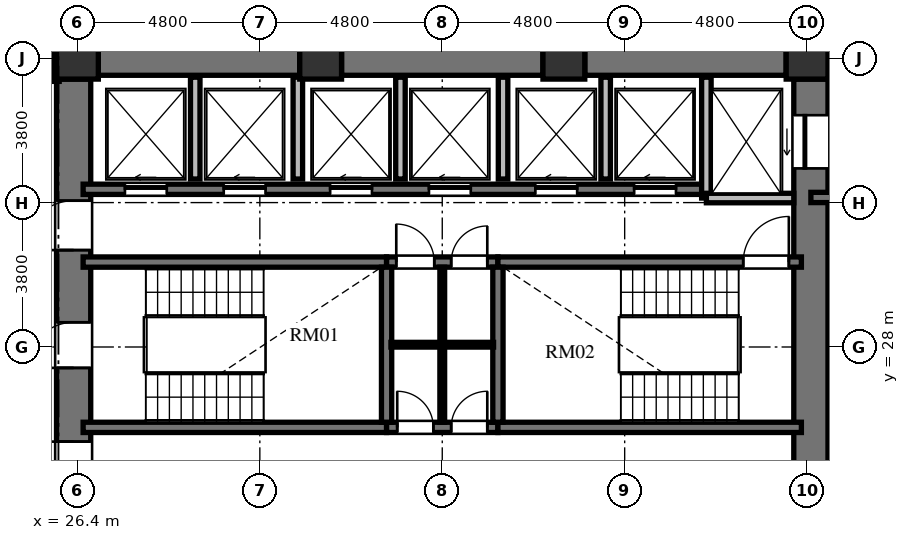
"""IFC4 building model, lengths in metres.
Left out: names, types, materials, properties, quantities, classifications, styles, units other than length and angle.
Written with IfcOpenShell. Run it as: python <this file> out.ifc"""

import sys

from ifc_helpers import new_model, si_unit, direction, frame, frame_2d, origin, origin_2d, place, context, subcontext, project, spatial, rectangle, extrude, element, fill, save


model = new_model("IFC4")
c1 = context("Model", 3, precision=1e-05, world=origin(), true_north=direction((0.0, 1.0)))
c2 = subcontext(c1, "Body", "Model", "MODEL_VIEW")
j1 = project(units=[si_unit("LENGTHUNIT", "METRE"), si_unit("PLANEANGLEUNIT", "RADIAN")], contexts=[c1])
p1 = place(None, origin())
s1 = spatial("IfcSite", under=j1, at=p1, CompositionType="ELEMENT")
p2 = place(p1, origin())
s2 = spatial("IfcBuilding", under=s1, at=p2, CompositionType="ELEMENT")
p3 = place(p2, frame((0.0, 0.0, 61.68)))
s3 = spatial("IfcBuildingStorey", under=s2, at=p3, CompositionType="ELEMENT", Elevation=61.68)
for number, where, z_axis, x_axis in (
    (1, (45.6, 35.6, 0.0), (0.0, 0.0, 1.0), (1.0, 0.0, 0.0)),
    (2, (39.2, 35.6, 0.0), (0.0, 0.0, 1.0), (1.0, 0.0, 0.0)),
    (3, (32.8, 35.6, 0.0), (0.0, 0.0, 1.0), (1.0, 0.0, 0.0)),
    (4, (26.4, 35.6, 0.0), (0.0, 0.0, 1.0), (1.0, 0.0, 0.0)),
):
    element("IfcColumn", number, at=place(p3, frame(where, z_axis=z_axis, x_axis=x_axis)), inside=s3, PredefinedType="COLUMN", context=c2, shape_type="SweptSolid", body=[
        extrude(rectangle(XDim=1.1, YDim=1.1, at=origin_2d()), origin(), (0.0, 0.0, 1.0), 3.648),
    ])
p4 = place(p3, frame((26.3, 20.95, 0.0), z_axis=(0.0, 0.0, 1.0), x_axis=(0.0, 1.0, 0.0)))
e5 = element("IfcWall", 5, at=p4, inside=s3, PredefinedType="SHEAR", context=c2, shape_type="SweptSolid", body=[
    extrude(rectangle(XDim=14.1, YDim=0.9, at=frame_2d((7.05, 0.0))), origin(), (0.0, 0.0, 1.0), 3.648),
])
p5 = place(p4, frame((6.5, 0.0, 0.0)))
e6 = element("IfcOpeningElement", 6, at=p5, cuts=e5, PredefinedType="OPENING", context=c2, shape_type="SweptSolid", body=[
    extrude(rectangle(XDim=1.2, YDim=2.15, at=frame_2d((0.6, 1.075))), frame((0.0, 0.46, 0.0), z_axis=(0.0, -1.0, 0.0), x_axis=(1.0, 0.0, 0.0)), (0.0, 0.0, 1.0), 0.92),
])
p6 = place(p4, frame((9.6, 0.0, 0.0)))
e7 = element("IfcOpeningElement", 7, at=p6, cuts=e5, PredefinedType="OPENING", context=c2, shape_type="SweptSolid", body=[
    extrude(rectangle(XDim=1.3, YDim=2.2, at=frame_2d((0.65, 1.1))), frame((0.0, 0.46, 0.0), z_axis=(0.0, -1.0, 0.0), x_axis=(1.0, 0.0, 0.0)), (0.0, 0.0, 1.0), 0.92),
])
p7 = place(p4, frame((3.26, 0.0, 0.0)))
e8 = element("IfcOpeningElement", 8, at=p7, cuts=e5, PredefinedType="OPENING", context=c2, shape_type="SweptSolid", body=[
    extrude(rectangle(XDim=1.3, YDim=2.2, at=frame_2d((0.65, 1.1))), frame((0.0, 0.46, 0.0), z_axis=(0.0, -1.0, 0.0), x_axis=(1.0, 0.0, 0.0)), (0.0, 0.0, 1.0), 0.92),
])
p8 = place(p3, frame((45.7, 20.95, 0.0), z_axis=(0.0, 0.0, 1.0), x_axis=(0.0, 1.0, 0.0)))
e9 = element("IfcWall", 9, at=p8, inside=s3, PredefinedType="SHEAR", context=c2, shape_type="SweptSolid", body=[
    extrude(rectangle(XDim=14.1, YDim=0.9, at=frame_2d((7.05, 0.0))), origin(), (0.0, 0.0, 1.0), 3.648),
])
p9 = place(p8, frame((11.75, 0.0, 0.0)))
e10 = element("IfcOpeningElement", 10, at=p9, cuts=e9, PredefinedType="OPENING", context=c2, shape_type="SweptSolid", body=[
    extrude(rectangle(XDim=1.4, YDim=2.3, at=frame_2d((0.7, 1.15))), frame((0.0, 0.46, 0.0), z_axis=(0.0, -1.0, 0.0), x_axis=(1.0, 0.0, 0.0)), (0.0, 0.0, 1.0), 0.92),
])
p10 = place(p8, frame((0.95, 0.0, 0.0)))
e11 = element("IfcOpeningElement", 11, at=p10, cuts=e9, PredefinedType="OPENING", context=c2, shape_type="SweptSolid", body=[
    extrude(rectangle(XDim=1.4, YDim=2.3, at=frame_2d((0.7, 1.15))), frame((0.0, 0.46, 0.0), z_axis=(0.0, -1.0, 0.0), x_axis=(1.0, 0.0, 0.0)), (0.0, 0.0, 1.0), 0.92),
])
p11 = place(p3, frame((26.95, 35.6, 0.0), z_axis=(0.0, 0.0, 1.0), x_axis=(1.0, 0.0, 0.0)))
e12 = element("IfcWall", 12, at=p11, inside=s3, PredefinedType="SHEAR", context=c2, shape_type="SweptSolid", body=[
    extrude(rectangle(XDim=5.3, YDim=0.9, at=frame_2d((2.65, 0.0))), origin(), (0.0, 0.0, 1.0), 3.648),
])
p12 = place(p3, frame((33.35, 35.6, 0.0), z_axis=(0.0, 0.0, 1.0), x_axis=(1.0, 0.0, 0.0)))
e13 = element("IfcWall", 13, at=p12, inside=s3, PredefinedType="SHEAR", context=c2, shape_type="SweptSolid", body=[
    extrude(rectangle(XDim=5.3, YDim=0.9, at=frame_2d((2.65, 0.0))), origin(), (0.0, 0.0, 1.0), 3.648),
])
p13 = place(p3, frame((39.75, 35.6, 0.0), z_axis=(0.0, 0.0, 1.0), x_axis=(1.0, 0.0, 0.0)))
e14 = element("IfcWall", 14, at=p13, inside=s3, PredefinedType="SHEAR", context=c2, shape_type="SweptSolid", body=[
    extrude(rectangle(XDim=5.3, YDim=0.9, at=frame_2d((2.65, 0.0))), origin(), (0.0, 0.0, 1.0), 3.648),
])
p14 = place(p3, frame((26.55, 30.235, 0.0), z_axis=(0.0, 0.0, 1.0), x_axis=(1.0, 0.0, 0.0)))
e15 = element("IfcWall", 15, at=p14, inside=s3, PredefinedType="SHEAR", context=c2, shape_type="SweptSolid", body=[
    extrude(rectangle(XDim=7.985, YDim=0.27, at=frame_2d((3.992, 0.0))), origin(), (0.0, 0.0, 1.0), 3.648),
])
p15 = place(p3, frame((34.535, 30.235, 0.0), z_axis=(0.0, 0.0, 1.0), x_axis=(1.0, 0.0, 0.0)))
e16 = element("IfcWall", 16, at=p15, inside=s3, PredefinedType="SHEAR", context=c2, shape_type="SweptSolid", body=[
    extrude(rectangle(XDim=2.93, YDim=0.27, at=frame_2d((1.465, 0.0))), origin(), (0.0, 0.0, 1.0), 3.648),
])
p16 = place(p15, frame((0.255, 0.0, 0.0)))
e17 = element("IfcOpeningElement", 17, at=p16, cuts=e16, PredefinedType="OPENING", context=c2, shape_type="SweptSolid", body=[
    extrude(rectangle(XDim=1.0, YDim=2.1, at=frame_2d((0.5, 1.05))), frame((0.0, 0.145, 0.0), z_axis=(0.0, -1.0, 0.0), x_axis=(1.0, 0.0, 0.0)), (0.0, 0.0, 1.0), 0.29),
])
p17 = place(p15, frame((1.7, 0.0, 0.0)))
e18 = element("IfcOpeningElement", 18, at=p17, cuts=e16, PredefinedType="OPENING", context=c2, shape_type="SweptSolid", body=[
    extrude(rectangle(XDim=0.95, YDim=2.1, at=frame_2d((0.475, 1.05))), frame((0.0, 0.145, 0.0), z_axis=(0.0, -1.0, 0.0), x_axis=(1.0, 0.0, 0.0)), (0.0, 0.0, 1.0), 0.29),
])
p18 = place(p3, frame((37.465, 30.235, 0.0), z_axis=(0.0, 0.0, 1.0), x_axis=(1.0, 0.0, 0.0)))
e19 = element("IfcWall", 19, at=p18, inside=s3, PredefinedType="SHEAR", context=c2, shape_type="SweptSolid", body=[
    extrude(rectangle(XDim=7.985, YDim=0.27, at=frame_2d((3.992, 0.0))), origin(), (0.0, 0.0, 1.0), 3.648),
])
p19 = place(p18, frame((6.455, 0.0, 0.0)))
e20 = element("IfcOpeningElement", 20, at=p19, cuts=e19, PredefinedType="OPENING", context=c2, shape_type="SweptSolid", body=[
    extrude(rectangle(XDim=1.2, YDim=2.15, at=frame_2d((0.6, 1.075))), frame((0.0, 0.145, 0.0), z_axis=(0.0, -1.0, 0.0), x_axis=(1.0, 0.0, 0.0)), (0.0, 0.0, 1.0), 0.29),
])
p20 = place(p3, frame((26.55, 25.885, 0.0), z_axis=(0.0, 0.0, 1.0), x_axis=(1.0, 0.0, 0.0)))
e21 = element("IfcWall", 21, at=p20, inside=s3, PredefinedType="SHEAR", context=c2, shape_type="SweptSolid", body=[
    extrude(rectangle(XDim=7.985, YDim=0.27, at=frame_2d((3.992, 0.0))), origin(), (0.0, 0.0, 1.0), 3.648),
])
p21 = place(p3, frame((34.535, 25.885, 0.0), z_axis=(0.0, 0.0, 1.0), x_axis=(1.0, 0.0, 0.0)))
e22 = element("IfcWall", 22, at=p21, inside=s3, PredefinedType="SHEAR", context=c2, shape_type="SweptSolid", body=[
    extrude(rectangle(XDim=2.93, YDim=0.27, at=frame_2d((1.465, 0.0))), origin(), (0.0, 0.0, 1.0), 3.648),
])
p22 = place(p21, frame((0.28, 0.0, 0.0)))
e23 = element("IfcOpeningElement", 23, at=p22, cuts=e22, PredefinedType="OPENING", context=c2, shape_type="SweptSolid", body=[
    extrude(rectangle(XDim=0.95, YDim=2.1, at=frame_2d((0.475, 1.05))), frame((0.0, 0.145, 0.0), z_axis=(0.0, -1.0, 0.0), x_axis=(1.0, 0.0, 0.0)), (0.0, 0.0, 1.0), 0.29),
])
p23 = place(p21, frame((1.7, 0.0, 0.0)))
e24 = element("IfcOpeningElement", 24, at=p23, cuts=e22, PredefinedType="OPENING", context=c2, shape_type="SweptSolid", body=[
    extrude(rectangle(XDim=0.95, YDim=2.1, at=frame_2d((0.475, 1.05))), frame((0.0, 0.145, 0.0), z_axis=(0.0, -1.0, 0.0), x_axis=(1.0, 0.0, 0.0)), (0.0, 0.0, 1.0), 0.29),
])
p24 = place(p3, frame((37.465, 25.885, 0.0), z_axis=(0.0, 0.0, 1.0), x_axis=(1.0, 0.0, 0.0)))
e25 = element("IfcWall", 25, at=p24, inside=s3, PredefinedType="SHEAR", context=c2, shape_type="SweptSolid", body=[
    extrude(rectangle(XDim=7.985, YDim=0.27, at=frame_2d((3.992, 0.0))), origin(), (0.0, 0.0, 1.0), 3.648),
])
for number, where, z_axis, x_axis in (
    (26, (34.535, 26.02, 0.0), (0.0, 0.0, 1.0), (0.0, 1.0, 0.0)),
    (27, (37.465, 26.02, 0.0), (0.0, 0.0, 1.0), (0.0, 1.0, 0.0)),
):
    element("IfcWall", number, at=place(p3, frame(where, z_axis=z_axis, x_axis=x_axis)), inside=s3, PredefinedType="SHEAR", context=c2, shape_type="SweptSolid", body=[
        extrude(rectangle(XDim=4.08, YDim=0.27, at=frame_2d((2.04, 0.0))), origin(), (0.0, 0.0, 1.0), 3.648),
    ])
p25 = place(p3, frame((34.65, 28.06, 0.0), z_axis=(0.0, 0.0, 1.0), x_axis=(1.0, 0.0, 0.0)))
e28 = element("IfcWall", 28, at=p25, inside=s3, PredefinedType="PARTITIONING", context=c2, shape_type="SweptSolid", body=[
    extrude(rectangle(XDim=2.7, YDim=0.125, at=frame_2d((1.35, 0.0))), origin(), (0.0, 0.0, 1.0), 3.428),
])
p26 = place(p3, frame((36.0, 26.02, 0.0), z_axis=(0.0, 0.0, 1.0), x_axis=(0.0, 1.0, 0.0)))
e29 = element("IfcWall", 29, at=p26, inside=s3, PredefinedType="PARTITIONING", context=c2, shape_type="SweptSolid", body=[
    extrude(rectangle(XDim=4.08, YDim=0.125, at=frame_2d((2.04, 0.0))), origin(), (0.0, 0.0, 1.0), 3.428),
])
p27 = place(p3, frame((26.55, 32.15, 0.0), z_axis=(0.0, 0.0, 1.0), x_axis=(1.0, 0.0, 0.0)))
e30 = element("IfcWall", 30, at=p27, inside=s3, PredefinedType="SHEAR", context=c2, shape_type="SweptSolid", body=[
    extrude(rectangle(XDim=16.4, YDim=0.27, at=frame_2d((8.2, 0.0))), origin(), (0.0, 0.0, 1.0), 3.648),
])
p28 = place(p27, frame((1.1, 0.0, 0.0)))
e31 = element("IfcOpeningElement", 31, at=p28, cuts=e30, PredefinedType="OPENING", context=c2, shape_type="SweptSolid", body=[
    extrude(rectangle(XDim=1.1, YDim=2.2, at=frame_2d((0.55, 1.1))), frame((0.0, 0.145, 0.0), z_axis=(0.0, -1.0, 0.0), x_axis=(1.0, 0.0, 0.0)), (0.0, 0.0, 1.0), 0.29),
])
p29 = place(p27, frame((3.7, 0.0, 0.0)))
e32 = element("IfcOpeningElement", 32, at=p29, cuts=e30, PredefinedType="OPENING", context=c2, shape_type="SweptSolid", body=[
    extrude(rectangle(XDim=1.1, YDim=2.2, at=frame_2d((0.55, 1.1))), frame((0.0, 0.145, 0.0), z_axis=(0.0, -1.0, 0.0), x_axis=(1.0, 0.0, 0.0)), (0.0, 0.0, 1.0), 0.29),
])
p30 = place(p27, frame((6.5, 0.0, 0.0)))
e33 = element("IfcOpeningElement", 33, at=p30, cuts=e30, PredefinedType="OPENING", context=c2, shape_type="SweptSolid", body=[
    extrude(rectangle(XDim=1.1, YDim=2.2, at=frame_2d((0.55, 1.1))), frame((0.0, 0.145, 0.0), z_axis=(0.0, -1.0, 0.0), x_axis=(1.0, 0.0, 0.0)), (0.0, 0.0, 1.0), 0.29),
])
p31 = place(p27, frame((9.1, 0.0, 0.0)))
e34 = element("IfcOpeningElement", 34, at=p31, cuts=e30, PredefinedType="OPENING", context=c2, shape_type="SweptSolid", body=[
    extrude(rectangle(XDim=1.1, YDim=2.2, at=frame_2d((0.55, 1.1))), frame((0.0, 0.145, 0.0), z_axis=(0.0, -1.0, 0.0), x_axis=(1.0, 0.0, 0.0)), (0.0, 0.0, 1.0), 0.29),
])
p32 = place(p27, frame((11.9, 0.0, 0.0)))
e35 = element("IfcOpeningElement", 35, at=p32, cuts=e30, PredefinedType="OPENING", context=c2, shape_type="SweptSolid", body=[
    extrude(rectangle(XDim=1.1, YDim=2.2, at=frame_2d((0.55, 1.1))), frame((0.0, 0.145, 0.0), z_axis=(0.0, -1.0, 0.0), x_axis=(1.0, 0.0, 0.0)), (0.0, 0.0, 1.0), 0.29),
])
p33 = place(p27, frame((14.5, 0.0, 0.0)))
e36 = element("IfcOpeningElement", 36, at=p33, cuts=e30, PredefinedType="OPENING", context=c2, shape_type="SweptSolid", body=[
    extrude(rectangle(XDim=1.1, YDim=2.2, at=frame_2d((0.55, 1.1))), frame((0.0, 0.145, 0.0), z_axis=(0.0, -1.0, 0.0), x_axis=(1.0, 0.0, 0.0)), (0.0, 0.0, 1.0), 0.29),
])
p34 = place(p3, frame((42.95, 31.92, 0.0), z_axis=(0.0, 0.0, 1.0), x_axis=(0.0, 1.0, 0.0)))
e37 = element("IfcWall", 37, at=p34, inside=s3, PredefinedType="SOLIDWALL", context=c2, shape_type="SweptSolid", body=[
    extrude(rectangle(XDim=3.18, YDim=0.25, at=frame_2d((1.59, 0.0))), origin(), (0.0, 0.0, 1.0), 3.428),
])
p35 = place(p3, frame((42.95, 31.92, 0.0), z_axis=(0.0, 0.0, 1.0), x_axis=(1.0, 0.0, 0.0)))
e38 = element("IfcWall", 38, at=p35, inside=s3, PredefinedType="SOLIDWALL", context=c2, shape_type="SweptSolid", body=[
    extrude(rectangle(XDim=2.3, YDim=0.25, at=frame_2d((1.15, 0.0))), origin(), (0.0, 0.0, 1.0), 3.428),
])
for number, where, z_axis, x_axis in (
    (39, (29.5, 32.42, 0.0), (0.0, 0.0, 1.0), (0.0, 1.0, 0.0)),
    (40, (32.2, 32.42, 0.0), (0.0, 0.0, 1.0), (0.0, 1.0, 0.0)),
    (41, (34.9, 32.42, 0.0), (0.0, 0.0, 1.0), (0.0, 1.0, 0.0)),
    (42, (37.6, 32.42, 0.0), (0.0, 0.0, 1.0), (0.0, 1.0, 0.0)),
    (43, (40.3, 32.42, 0.0), (0.0, 0.0, 1.0), (0.0, 1.0, 0.0)),
):
    element("IfcWall", number, at=place(p3, frame(where, z_axis=z_axis, x_axis=x_axis)), inside=s3, PredefinedType="SOLIDWALL", context=c2, shape_type="SweptSolid", body=[
        extrude(rectangle(XDim=2.68, YDim=0.25, at=frame_2d((1.34, 0.0))), origin(), (0.0, 0.0, 1.0), 3.428),
    ])
p36 = place(p3, frame((45.7, 31.935, 0.0), z_axis=(0.0, 0.0, 1.0), x_axis=(1.0, 0.0, 0.0)))
e44 = element("IfcWall", 44, at=p36, inside=s3, PredefinedType="SHEAR", context=c2, shape_type="SweptSolid", body=[
    extrude(rectangle(XDim=4.715, YDim=0.27, at=frame_2d((2.357, 0.0))), origin(), (0.0, 0.0, 1.0), 3.648),
])
p37 = place(p3, frame((25.83, 36.21, 0.0), z_axis=(0.0, 0.0, 1.0), x_axis=(0.0, -1.0, 0.0)))
e45 = element("IfcWall", 45, at=p37, inside=s3, PredefinedType="PARTITIONING", context=c2, shape_type="SweptSolid", body=[
    extrude(rectangle(XDim=1.22, YDim=0.18, at=frame_2d((0.61, 0.0))), origin(), (0.0, 0.0, 1.0), 3.428),
])
p38 = place(p5, origin())
e46 = element("IfcDoor", 46, at=p38, inside=s3, OperationType="SINGLE_SWING_LEFT", PredefinedType="DOOR", context=c2, shape_type="SweptSolid", body=[
    extrude(rectangle(XDim=1.2, YDim=2.15, at=frame_2d((0.6, 1.075))), frame((0.0, 0.025, 0.0), z_axis=(0.0, -1.0, 0.0), x_axis=(1.0, 0.0, 0.0)), (0.0, 0.0, 1.0), 0.05),
])
fill(e6, e46)
p39 = place(p19, origin())
e47 = element("IfcDoor", 47, at=p39, inside=s3, OperationType="SINGLE_SWING_RIGHT", PredefinedType="DOOR", context=c2, shape_type="SweptSolid", body=[
    extrude(rectangle(XDim=1.2, YDim=2.15, at=frame_2d((0.6, 1.075))), frame((0.0, 0.025, 0.0), z_axis=(0.0, -1.0, 0.0), x_axis=(1.0, 0.0, 0.0)), (0.0, 0.0, 1.0), 0.05),
])
fill(e20, e47)
p40 = place(p22, origin())
e48 = element("IfcDoor", 48, at=p40, inside=s3, OperationType="SINGLE_SWING_LEFT", PredefinedType="DOOR", context=c2, shape_type="SweptSolid", body=[
    extrude(rectangle(XDim=0.95, YDim=2.1, at=frame_2d((0.475, 1.05))), frame((0.0, 0.025, 0.0), z_axis=(0.0, -1.0, 0.0), x_axis=(1.0, 0.0, 0.0)), (0.0, 0.0, 1.0), 0.05),
])
fill(e23, e48)
p41 = place(p23, origin())
e49 = element("IfcDoor", 49, at=p41, inside=s3, OperationType="SINGLE_SWING_RIGHT", PredefinedType="DOOR", context=c2, shape_type="SweptSolid", body=[
    extrude(rectangle(XDim=0.95, YDim=2.1, at=frame_2d((0.475, 1.05))), frame((0.0, 0.025, 0.0), z_axis=(0.0, -1.0, 0.0), x_axis=(1.0, 0.0, 0.0)), (0.0, 0.0, 1.0), 0.05),
])
fill(e24, e49)
p42 = place(p16, origin())
e50 = element("IfcDoor", 50, at=p42, inside=s3, OperationType="SINGLE_SWING_LEFT", PredefinedType="DOOR", context=c2, shape_type="SweptSolid", body=[
    extrude(rectangle(XDim=1.0, YDim=2.1, at=frame_2d((0.5, 1.05))), frame((0.0, 0.025, 0.0), z_axis=(0.0, -1.0, 0.0), x_axis=(1.0, 0.0, 0.0)), (0.0, 0.0, 1.0), 0.05),
])
fill(e17, e50)
p43 = place(p17, origin())
e51 = element("IfcDoor", 51, at=p43, inside=s3, OperationType="SINGLE_SWING_RIGHT", PredefinedType="DOOR", context=c2, shape_type="SweptSolid", body=[
    extrude(rectangle(XDim=0.95, YDim=2.1, at=frame_2d((0.475, 1.05))), frame((0.0, 0.025, 0.0), z_axis=(0.0, -1.0, 0.0), x_axis=(1.0, 0.0, 0.0)), (0.0, 0.0, 1.0), 0.05),
])
fill(e18, e51)
p44 = place(p6, origin())
e52 = element("IfcDoor", 52, at=p44, inside=s3, OperationType="SINGLE_SWING_LEFT", PredefinedType="DOOR", context=c2, shape_type="SweptSolid", body=[
    extrude(rectangle(XDim=1.3, YDim=2.2, at=frame_2d((0.65, 1.1))), frame((0.0, 0.025, 0.0), z_axis=(0.0, -1.0, 0.0), x_axis=(1.0, 0.0, 0.0)), (0.0, 0.0, 1.0), 0.05),
])
fill(e7, e52)
p45 = place(p7, origin())
e53 = element("IfcDoor", 53, at=p45, inside=s3, OperationType="SINGLE_SWING_RIGHT", PredefinedType="DOOR", context=c2, shape_type="SweptSolid", body=[
    extrude(rectangle(XDim=1.3, YDim=2.2, at=frame_2d((0.65, 1.1))), frame((0.0, 0.025, 0.0), z_axis=(0.0, -1.0, 0.0), x_axis=(1.0, 0.0, 0.0)), (0.0, 0.0, 1.0), 0.05),
])
fill(e8, e53)
p46 = place(p28, origin())
e54 = element("IfcDoor", 54, at=p46, inside=s3, OperationType="SLIDING_TO_LEFT", PredefinedType="DOOR", context=c2, shape_type="SweptSolid", body=[
    extrude(rectangle(XDim=1.1, YDim=2.2, at=frame_2d((0.55, 1.1))), frame((0.0, 0.025, 0.0), z_axis=(0.0, -1.0, 0.0), x_axis=(1.0, 0.0, 0.0)), (0.0, 0.0, 1.0), 0.05),
])
fill(e31, e54)
p47 = place(p29, origin())
e55 = element("IfcDoor", 55, at=p47, inside=s3, OperationType="SLIDING_TO_LEFT", PredefinedType="DOOR", context=c2, shape_type="SweptSolid", body=[
    extrude(rectangle(XDim=1.1, YDim=2.2, at=frame_2d((0.55, 1.1))), frame((0.0, 0.025, 0.0), z_axis=(0.0, -1.0, 0.0), x_axis=(1.0, 0.0, 0.0)), (0.0, 0.0, 1.0), 0.05),
])
fill(e32, e55)
p48 = place(p30, origin())
e56 = element("IfcDoor", 56, at=p48, inside=s3, OperationType="SLIDING_TO_LEFT", PredefinedType="DOOR", context=c2, shape_type="SweptSolid", body=[
    extrude(rectangle(XDim=1.1, YDim=2.2, at=frame_2d((0.55, 1.1))), frame((0.0, 0.025, 0.0), z_axis=(0.0, -1.0, 0.0), x_axis=(1.0, 0.0, 0.0)), (0.0, 0.0, 1.0), 0.05),
])
fill(e33, e56)
p49 = place(p31, origin())
e57 = element("IfcDoor", 57, at=p49, inside=s3, OperationType="SLIDING_TO_LEFT", PredefinedType="DOOR", context=c2, shape_type="SweptSolid", body=[
    extrude(rectangle(XDim=1.1, YDim=2.2, at=frame_2d((0.55, 1.1))), frame((0.0, 0.025, 0.0), z_axis=(0.0, -1.0, 0.0), x_axis=(1.0, 0.0, 0.0)), (0.0, 0.0, 1.0), 0.05),
])
fill(e34, e57)
p50 = place(p32, origin())
e58 = element("IfcDoor", 58, at=p50, inside=s3, OperationType="SLIDING_TO_LEFT", PredefinedType="DOOR", context=c2, shape_type="SweptSolid", body=[
    extrude(rectangle(XDim=1.1, YDim=2.2, at=frame_2d((0.55, 1.1))), frame((0.0, 0.025, 0.0), z_axis=(0.0, -1.0, 0.0), x_axis=(1.0, 0.0, 0.0)), (0.0, 0.0, 1.0), 0.05),
])
fill(e35, e58)
p51 = place(p33, origin())
e59 = element("IfcDoor", 59, at=p51, inside=s3, OperationType="SLIDING_TO_LEFT", PredefinedType="DOOR", context=c2, shape_type="SweptSolid", body=[
    extrude(rectangle(XDim=1.1, YDim=2.2, at=frame_2d((0.55, 1.1))), frame((0.0, 0.025, 0.0), z_axis=(0.0, -1.0, 0.0), x_axis=(1.0, 0.0, 0.0)), (0.0, 0.0, 1.0), 0.05),
])
fill(e36, e59)
p52 = place(p9, origin())
e60 = element("IfcDoor", 60, at=p52, inside=s3, OperationType="SLIDING_TO_LEFT", PredefinedType="DOOR", context=c2, shape_type="SweptSolid", body=[
    extrude(rectangle(XDim=1.4, YDim=2.3, at=frame_2d((0.7, 1.15))), frame((0.0, 0.025, 0.0), z_axis=(0.0, -1.0, 0.0), x_axis=(1.0, 0.0, 0.0)), (0.0, 0.0, 1.0), 0.05),
])
fill(e10, e60)
save(model, sys.argv[1])
